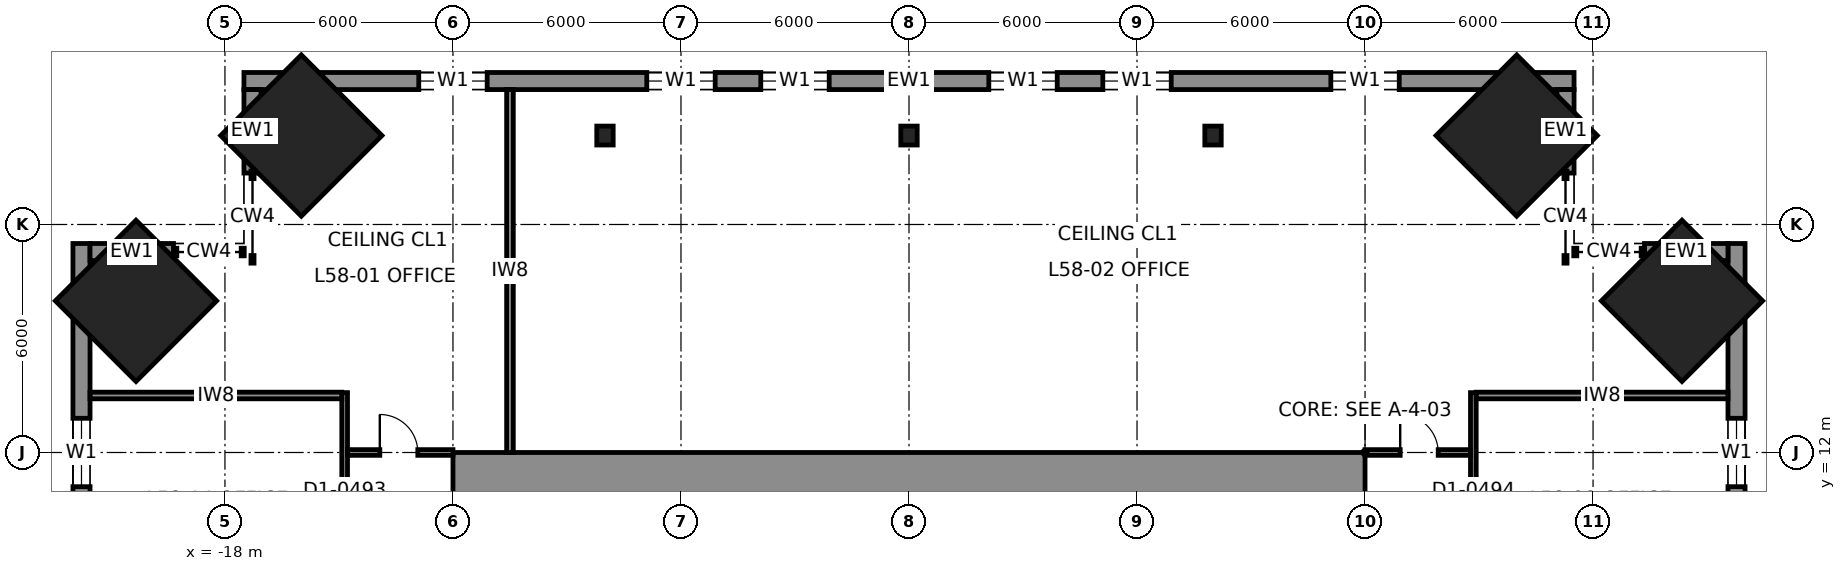
"""IFC4 building model, lengths in metres.
Left out: names, types, materials, properties, quantities, classifications, styles, units other than length and angle.
Written with IfcOpenShell. Run it as: python <this file> out.ifc"""

import sys

from ifc_helpers import new_model, si_unit, direction, frame, frame_2d, origin, origin_2d, place, context, subcontext, project, spatial, rectangle, i_section, extrude, element, fill, save


model = new_model("IFC4")
c1 = context("Model", 3, precision=1e-05, world=origin(), true_north=direction((0.0, 1.0)))
c2 = subcontext(c1, "Body", "Model", "MODEL_VIEW")
j1 = project(units=[si_unit("LENGTHUNIT", "METRE"), si_unit("PLANEANGLEUNIT", "RADIAN")], contexts=[c1])
p1 = place(None, origin())
s1 = spatial("IfcSite", under=j1, at=p1, CompositionType="ELEMENT")
p2 = place(p1, origin())
s2 = spatial("IfcBuilding", under=s1, at=p2, CompositionType="ELEMENT")
p3 = place(p2, frame((0.0, 0.0, 261.8)))
s3 = spatial("IfcBuildingStorey", under=s2, at=p3, CompositionType="ELEMENT", Elevation=261.8)
for number, where, z_axis, x_axis in (
    (1, (15.99, 20.34, 0.0), (-0.04, -0.04, 0.998), (0.708, -0.707, 0.0)),
    (2, (20.34, 15.99, 0.0), (-0.04, -0.04, 0.998), (0.707, -0.708, 0.0)),
    (3, (-20.34, 15.99, 0.0), (0.04, -0.04, 0.998), (0.707, 0.708, 0.0)),
    (4, (-15.99, 20.34, 0.0), (0.04, -0.04, 0.998), (0.708, 0.707, 0.0)),
):
    element("IfcColumn", number, at=place(p3, frame(where, z_axis=z_axis, x_axis=x_axis)), inside=s3, PredefinedType="COLUMN", context=c2, shape_type="SweptSolid", body=[
        extrude(rectangle(XDim=3.0, YDim=3.0, at=origin_2d()), origin(), (0.0, 0.0, 1.0), 4.007),
    ])
for number, where, z_axis, x_axis in (
    (5, (0.0, 20.34, 0.0), (0.0, -0.04, 0.999), (1.0, 0.0, 0.0)),
    (6, (8.0, 20.34, 0.0), (0.0, -0.04, 0.999), (1.0, 0.0, 0.0)),
    (7, (-8.0, 20.34, 0.0), (0.0, -0.04, 0.999), (1.0, 0.0, 0.0)),
):
    element("IfcColumn", number, at=place(p3, frame(where, z_axis=z_axis, x_axis=x_axis)), inside=s3, PredefinedType="COLUMN", context=c2, shape_type="SweptSolid", body=[
        extrude(i_section(OverallWidth=0.432, OverallDepth=0.498, WebThickness=0.056, FlangeThickness=0.089, at=origin_2d()), origin(), (0.0, 0.0, 1.0), 4.003),
    ])
p4 = place(p3, frame((-12.0, 11.25, 0.0), z_axis=(0.0, 0.0, 1.0), x_axis=(1.0, 0.0, 0.0)))
e8 = element("IfcWall", 8, at=p4, inside=s3, PredefinedType="SHEAR", context=c2, shape_type="SweptSolid", body=[
    extrude(rectangle(XDim=24.0, YDim=1.5, at=frame_2d((12.0, 0.0))), origin(), (0.0, 0.0, 1.0), 4.0),
])
p5 = place(p3, frame((17.5, 21.775, 0.0), z_axis=(0.0, 0.0, 1.0), x_axis=(-1.0, 0.0, 0.0)))
e9 = element("IfcWall", 9, at=p5, inside=s3, PredefinedType="SOLIDWALL", context=c2, shape_type="SweptSolid", body=[
    extrude(rectangle(XDim=35.0, YDim=0.45, at=frame_2d((17.5, 0.0))), origin(), (0.0, 0.0, 1.0), 3.83),
])
p6 = place(p5, frame((4.6, 0.0, 0.7)))
e10 = element("IfcOpeningElement", 10, at=p6, cuts=e9, PredefinedType="OPENING", context=c2, shape_type="SweptSolid", body=[
    extrude(rectangle(XDim=1.8, YDim=2.6, at=frame_2d((0.9, 1.3))), frame((0.0, 0.235, 0.0), z_axis=(0.0, -1.0, 0.0), x_axis=(1.0, 0.0, 0.0)), (0.0, 0.0, 1.0), 0.47),
])
p7 = place(p5, frame((10.6, 0.0, 0.7)))
e11 = element("IfcOpeningElement", 11, at=p7, cuts=e9, PredefinedType="OPENING", context=c2, shape_type="SweptSolid", body=[
    extrude(rectangle(XDim=1.8, YDim=2.6, at=frame_2d((0.9, 1.3))), frame((0.0, 0.235, 0.0), z_axis=(0.0, -1.0, 0.0), x_axis=(1.0, 0.0, 0.0)), (0.0, 0.0, 1.0), 0.47),
])
p8 = place(p5, frame((13.6, 0.0, 0.7)))
e12 = element("IfcOpeningElement", 12, at=p8, cuts=e9, PredefinedType="OPENING", context=c2, shape_type="SweptSolid", body=[
    extrude(rectangle(XDim=1.8, YDim=2.6, at=frame_2d((0.9, 1.3))), frame((0.0, 0.235, 0.0), z_axis=(0.0, -1.0, 0.0), x_axis=(1.0, 0.0, 0.0)), (0.0, 0.0, 1.0), 0.47),
])
p9 = place(p5, frame((19.6, 0.0, 0.7)))
e13 = element("IfcOpeningElement", 13, at=p9, cuts=e9, PredefinedType="OPENING", context=c2, shape_type="SweptSolid", body=[
    extrude(rectangle(XDim=1.8, YDim=2.6, at=frame_2d((0.9, 1.3))), frame((0.0, 0.235, 0.0), z_axis=(0.0, -1.0, 0.0), x_axis=(1.0, 0.0, 0.0)), (0.0, 0.0, 1.0), 0.47),
])
p10 = place(p5, frame((22.6, 0.0, 0.7)))
e14 = element("IfcOpeningElement", 14, at=p10, cuts=e9, PredefinedType="OPENING", context=c2, shape_type="SweptSolid", body=[
    extrude(rectangle(XDim=1.8, YDim=2.6, at=frame_2d((0.9, 1.3))), frame((0.0, 0.235, 0.0), z_axis=(0.0, -1.0, 0.0), x_axis=(1.0, 0.0, 0.0)), (0.0, 0.0, 1.0), 0.47),
])
p11 = place(p5, frame((28.6, 0.0, 0.7)))
e15 = element("IfcOpeningElement", 15, at=p11, cuts=e9, PredefinedType="OPENING", context=c2, shape_type="SweptSolid", body=[
    extrude(rectangle(XDim=1.8, YDim=2.6, at=frame_2d((0.9, 1.3))), frame((0.0, 0.235, 0.0), z_axis=(0.0, -1.0, 0.0), x_axis=(1.0, 0.0, 0.0)), (0.0, 0.0, 1.0), 0.47),
])
p12 = place(p3, frame((21.775, -17.5, 0.0), z_axis=(0.0, 0.0, 1.0), x_axis=(0.0, 1.0, 0.0)))
e16 = element("IfcWall", 16, at=p12, inside=s3, PredefinedType="SOLIDWALL", context=c2, shape_type="SweptSolid", body=[
    extrude(rectangle(XDim=35.0, YDim=0.45, at=frame_2d((17.5, 0.0))), origin(), (0.0, 0.0, 1.0), 3.83),
])
p13 = place(p12, frame((4.6, 0.0, 0.7)))
e17 = element("IfcOpeningElement", 17, at=p13, cuts=e16, PredefinedType="OPENING", context=c2, shape_type="SweptSolid", body=[
    extrude(rectangle(XDim=1.8, YDim=2.6, at=frame_2d((0.9, 1.3))), frame((0.0, 0.235, 0.0), z_axis=(0.0, -1.0, 0.0), x_axis=(1.0, 0.0, 0.0)), (0.0, 0.0, 1.0), 0.47),
])
p14 = place(p12, frame((10.6, 0.0, 0.7)))
e18 = element("IfcOpeningElement", 18, at=p14, cuts=e16, PredefinedType="OPENING", context=c2, shape_type="SweptSolid", body=[
    extrude(rectangle(XDim=1.8, YDim=2.6, at=frame_2d((0.9, 1.3))), frame((0.0, 0.235, 0.0), z_axis=(0.0, -1.0, 0.0), x_axis=(1.0, 0.0, 0.0)), (0.0, 0.0, 1.0), 0.47),
])
p15 = place(p12, frame((13.6, 0.0, 0.7)))
e19 = element("IfcOpeningElement", 19, at=p15, cuts=e16, PredefinedType="OPENING", context=c2, shape_type="SweptSolid", body=[
    extrude(rectangle(XDim=1.8, YDim=2.6, at=frame_2d((0.9, 1.3))), frame((0.0, 0.235, 0.0), z_axis=(0.0, -1.0, 0.0), x_axis=(1.0, 0.0, 0.0)), (0.0, 0.0, 1.0), 0.47),
])
p16 = place(p12, frame((19.6, 0.0, 0.7)))
e20 = element("IfcOpeningElement", 20, at=p16, cuts=e16, PredefinedType="OPENING", context=c2, shape_type="SweptSolid", body=[
    extrude(rectangle(XDim=1.8, YDim=2.6, at=frame_2d((0.9, 1.3))), frame((0.0, 0.235, 0.0), z_axis=(0.0, -1.0, 0.0), x_axis=(1.0, 0.0, 0.0)), (0.0, 0.0, 1.0), 0.47),
])
p17 = place(p12, frame((22.6, 0.0, 0.7)))
e21 = element("IfcOpeningElement", 21, at=p17, cuts=e16, PredefinedType="OPENING", context=c2, shape_type="SweptSolid", body=[
    extrude(rectangle(XDim=1.8, YDim=2.6, at=frame_2d((0.9, 1.3))), frame((0.0, 0.235, 0.0), z_axis=(0.0, -1.0, 0.0), x_axis=(1.0, 0.0, 0.0)), (0.0, 0.0, 1.0), 0.47),
])
p18 = place(p12, frame((28.6, 0.0, 0.7)))
e22 = element("IfcOpeningElement", 22, at=p18, cuts=e16, PredefinedType="OPENING", context=c2, shape_type="SweptSolid", body=[
    extrude(rectangle(XDim=1.8, YDim=2.6, at=frame_2d((0.9, 1.3))), frame((0.0, 0.235, 0.0), z_axis=(0.0, -1.0, 0.0), x_axis=(1.0, 0.0, 0.0)), (0.0, 0.0, 1.0), 0.47),
])
p19 = place(p3, frame((-21.775, 17.5, 0.0), z_axis=(0.0, 0.0, 1.0), x_axis=(0.0, -1.0, 0.0)))
e23 = element("IfcWall", 23, at=p19, inside=s3, PredefinedType="SOLIDWALL", context=c2, shape_type="SweptSolid", body=[
    extrude(rectangle(XDim=35.0, YDim=0.45, at=frame_2d((17.5, 0.0))), origin(), (0.0, 0.0, 1.0), 3.83),
])
p20 = place(p19, frame((4.6, 0.0, 0.7)))
e24 = element("IfcOpeningElement", 24, at=p20, cuts=e23, PredefinedType="OPENING", context=c2, shape_type="SweptSolid", body=[
    extrude(rectangle(XDim=1.8, YDim=2.6, at=frame_2d((0.9, 1.3))), frame((0.0, 0.235, 0.0), z_axis=(0.0, -1.0, 0.0), x_axis=(1.0, 0.0, 0.0)), (0.0, 0.0, 1.0), 0.47),
])
p21 = place(p19, frame((10.6, 0.0, 0.7)))
e25 = element("IfcOpeningElement", 25, at=p21, cuts=e23, PredefinedType="OPENING", context=c2, shape_type="SweptSolid", body=[
    extrude(rectangle(XDim=1.8, YDim=2.6, at=frame_2d((0.9, 1.3))), frame((0.0, 0.235, 0.0), z_axis=(0.0, -1.0, 0.0), x_axis=(1.0, 0.0, 0.0)), (0.0, 0.0, 1.0), 0.47),
])
p22 = place(p19, frame((13.6, 0.0, 0.7)))
e26 = element("IfcOpeningElement", 26, at=p22, cuts=e23, PredefinedType="OPENING", context=c2, shape_type="SweptSolid", body=[
    extrude(rectangle(XDim=1.8, YDim=2.6, at=frame_2d((0.9, 1.3))), frame((0.0, 0.235, 0.0), z_axis=(0.0, -1.0, 0.0), x_axis=(1.0, 0.0, 0.0)), (0.0, 0.0, 1.0), 0.47),
])
p23 = place(p19, frame((19.6, 0.0, 0.7)))
e27 = element("IfcOpeningElement", 27, at=p23, cuts=e23, PredefinedType="OPENING", context=c2, shape_type="SweptSolid", body=[
    extrude(rectangle(XDim=1.8, YDim=2.6, at=frame_2d((0.9, 1.3))), frame((0.0, 0.235, 0.0), z_axis=(0.0, -1.0, 0.0), x_axis=(1.0, 0.0, 0.0)), (0.0, 0.0, 1.0), 0.47),
])
p24 = place(p19, frame((22.6, 0.0, 0.7)))
e28 = element("IfcOpeningElement", 28, at=p24, cuts=e23, PredefinedType="OPENING", context=c2, shape_type="SweptSolid", body=[
    extrude(rectangle(XDim=1.8, YDim=2.6, at=frame_2d((0.9, 1.3))), frame((0.0, 0.235, 0.0), z_axis=(0.0, -1.0, 0.0), x_axis=(1.0, 0.0, 0.0)), (0.0, 0.0, 1.0), 0.47),
])
p25 = place(p19, frame((28.6, 0.0, 0.7)))
e29 = element("IfcOpeningElement", 29, at=p25, cuts=e23, PredefinedType="OPENING", context=c2, shape_type="SweptSolid", body=[
    extrude(rectangle(XDim=1.8, YDim=2.6, at=frame_2d((0.9, 1.3))), frame((0.0, 0.235, 0.0), z_axis=(0.0, -1.0, 0.0), x_axis=(1.0, 0.0, 0.0)), (0.0, 0.0, 1.0), 0.47),
])
for number, where, z_axis, x_axis in (
    (30, (17.275, 19.354, 0.0), (0.0, 0.0, 1.0), (0.0, 1.0, 0.0)),
    (31, (19.354, 17.275, 0.0), (0.0, 0.0, 1.0), (1.0, 0.0, 0.0)),
    (32, (-17.275, 19.354, 0.0), (0.0, 0.0, 1.0), (0.0, 1.0, 0.0)),
    (33, (-19.354, 17.275, 0.0), (0.0, 0.0, 1.0), (-1.0, 0.0, 0.0)),
):
    element("IfcWall", number, at=place(p3, frame(where, z_axis=z_axis, x_axis=x_axis)), inside=s3, PredefinedType="SOLIDWALL", context=c2, shape_type="SweptSolid", body=[
        extrude(rectangle(XDim=2.196, YDim=0.45, at=frame_2d((1.098, 0.0))), origin(), (0.0, 0.0, 1.0), 3.83),
    ])
p26 = place(p3, frame((14.85, -13.575, 0.0), z_axis=(0.0, 0.0, 1.0), x_axis=(0.0, 1.0, 0.0)))
e34 = element("IfcWall", 34, at=p26, inside=s3, PredefinedType="PARTITIONING", context=c2, shape_type="SweptSolid", body=[
    extrude(rectangle(XDim=27.15, YDim=0.15, at=frame_2d((13.575, 0.0))), origin(), (0.0, 0.0, 1.0), 3.83),
])
p27 = place(p26, frame((3.175, 0.0, 0.0)))
e35 = element("IfcOpeningElement", 35, at=p27, cuts=e34, PredefinedType="OPENING", context=c2, shape_type="SweptSolid", body=[
    extrude(rectangle(XDim=1.0, YDim=2.3, at=frame_2d((0.5, 1.15))), frame((0.0, 0.085, 0.0), z_axis=(0.0, -1.0, 0.0), x_axis=(1.0, 0.0, 0.0)), (0.0, 0.0, 1.0), 0.17),
])
p28 = place(p26, frame((6.625, 0.0, 0.0)))
e36 = element("IfcOpeningElement", 36, at=p28, cuts=e34, PredefinedType="OPENING", context=c2, shape_type="SweptSolid", body=[
    extrude(rectangle(XDim=1.0, YDim=2.3, at=frame_2d((0.5, 1.15))), frame((0.0, 0.085, 0.0), z_axis=(0.0, -1.0, 0.0), x_axis=(1.0, 0.0, 0.0)), (0.0, 0.0, 1.0), 0.17),
])
p29 = place(p26, frame((19.775, 0.0, 0.0)))
e37 = element("IfcOpeningElement", 37, at=p29, cuts=e34, PredefinedType="OPENING", context=c2, shape_type="SweptSolid", body=[
    extrude(rectangle(XDim=1.0, YDim=2.3, at=frame_2d((0.5, 1.15))), frame((0.0, 0.085, 0.0), z_axis=(0.0, -1.0, 0.0), x_axis=(1.0, 0.0, 0.0)), (0.0, 0.0, 1.0), 0.17),
])
p30 = place(p26, frame((22.975, 0.0, 0.0)))
e38 = element("IfcOpeningElement", 38, at=p30, cuts=e34, PredefinedType="OPENING", context=c2, shape_type="SweptSolid", body=[
    extrude(rectangle(XDim=1.0, YDim=2.3, at=frame_2d((0.5, 1.15))), frame((0.0, 0.085, 0.0), z_axis=(0.0, -1.0, 0.0), x_axis=(1.0, 0.0, 0.0)), (0.0, 0.0, 1.0), 0.17),
])
p31 = place(p26, frame((16.825, 0.0, 0.0)))
e39 = element("IfcOpeningElement", 39, at=p31, cuts=e34, PredefinedType="OPENING", context=c2, shape_type="SweptSolid", body=[
    extrude(rectangle(XDim=1.0, YDim=2.3, at=frame_2d((0.5, 1.15))), frame((0.0, 0.085, 0.0), z_axis=(0.0, -1.0, 0.0), x_axis=(1.0, 0.0, 0.0)), (0.0, 0.0, 1.0), 0.17),
])
p32 = place(p26, frame((9.575, 0.0, 0.0)))
e40 = element("IfcOpeningElement", 40, at=p32, cuts=e34, PredefinedType="OPENING", context=c2, shape_type="SweptSolid", body=[
    extrude(rectangle(XDim=1.0, YDim=2.3, at=frame_2d((0.5, 1.15))), frame((0.0, 0.085, 0.0), z_axis=(0.0, -1.0, 0.0), x_axis=(1.0, 0.0, 0.0)), (0.0, 0.0, 1.0), 0.17),
])
p33 = place(p3, frame((-14.85, 13.575, 0.0), z_axis=(0.0, 0.0, 1.0), x_axis=(0.0, -1.0, 0.0)))
e41 = element("IfcWall", 41, at=p33, inside=s3, PredefinedType="PARTITIONING", context=c2, shape_type="SweptSolid", body=[
    extrude(rectangle(XDim=27.15, YDim=0.15, at=frame_2d((13.575, 0.0))), origin(), (0.0, 0.0, 1.0), 3.83),
])
p34 = place(p33, frame((22.975, 0.0, 0.0)))
e42 = element("IfcOpeningElement", 42, at=p34, cuts=e41, PredefinedType="OPENING", context=c2, shape_type="SweptSolid", body=[
    extrude(rectangle(XDim=1.0, YDim=2.3, at=frame_2d((0.5, 1.15))), frame((0.0, 0.085, 0.0), z_axis=(0.0, -1.0, 0.0), x_axis=(1.0, 0.0, 0.0)), (0.0, 0.0, 1.0), 0.17),
])
p35 = place(p33, frame((19.525, 0.0, 0.0)))
e43 = element("IfcOpeningElement", 43, at=p35, cuts=e41, PredefinedType="OPENING", context=c2, shape_type="SweptSolid", body=[
    extrude(rectangle(XDim=1.0, YDim=2.3, at=frame_2d((0.5, 1.15))), frame((0.0, 0.085, 0.0), z_axis=(0.0, -1.0, 0.0), x_axis=(1.0, 0.0, 0.0)), (0.0, 0.0, 1.0), 0.17),
])
p36 = place(p33, frame((6.375, 0.0, 0.0)))
e44 = element("IfcOpeningElement", 44, at=p36, cuts=e41, PredefinedType="OPENING", context=c2, shape_type="SweptSolid", body=[
    extrude(rectangle(XDim=1.0, YDim=2.3, at=frame_2d((0.5, 1.15))), frame((0.0, 0.085, 0.0), z_axis=(0.0, -1.0, 0.0), x_axis=(1.0, 0.0, 0.0)), (0.0, 0.0, 1.0), 0.17),
])
p37 = place(p33, frame((3.175, 0.0, 0.0)))
e45 = element("IfcOpeningElement", 45, at=p37, cuts=e41, PredefinedType="OPENING", context=c2, shape_type="SweptSolid", body=[
    extrude(rectangle(XDim=1.0, YDim=2.3, at=frame_2d((0.5, 1.15))), frame((0.0, 0.085, 0.0), z_axis=(0.0, -1.0, 0.0), x_axis=(1.0, 0.0, 0.0)), (0.0, 0.0, 1.0), 0.17),
])
p38 = place(p33, frame((9.575, 0.0, 0.0)))
e46 = element("IfcOpeningElement", 46, at=p38, cuts=e41, PredefinedType="OPENING", context=c2, shape_type="SweptSolid", body=[
    extrude(rectangle(XDim=1.0, YDim=2.3, at=frame_2d((0.5, 1.15))), frame((0.0, 0.085, 0.0), z_axis=(0.0, -1.0, 0.0), x_axis=(1.0, 0.0, 0.0)), (0.0, 0.0, 1.0), 0.17),
])
p39 = place(p33, frame((16.575, 0.0, 0.0)))
e47 = element("IfcOpeningElement", 47, at=p39, cuts=e41, PredefinedType="OPENING", context=c2, shape_type="SweptSolid", body=[
    extrude(rectangle(XDim=1.0, YDim=2.3, at=frame_2d((0.5, 1.15))), frame((0.0, 0.085, 0.0), z_axis=(0.0, -1.0, 0.0), x_axis=(1.0, 0.0, 0.0)), (0.0, 0.0, 1.0), 0.17),
])
p40 = place(p3, frame((12.0, 12.0, 0.0), z_axis=(0.0, 0.0, 1.0), x_axis=(1.0, 0.0, 0.0)))
e48 = element("IfcWall", 48, at=p40, inside=s3, PredefinedType="PARTITIONING", context=c2, shape_type="SweptSolid", body=[
    extrude(rectangle(XDim=2.775, YDim=0.15, at=frame_2d((1.387, 0.0))), origin(), (0.0, 0.0, 1.0), 3.83),
])
p41 = place(p40, frame((0.925, 0.0, 0.0)))
e49 = element("IfcOpeningElement", 49, at=p41, cuts=e48, PredefinedType="OPENING", context=c2, shape_type="SweptSolid", body=[
    extrude(rectangle(XDim=1.0, YDim=2.3, at=frame_2d((0.5, 1.15))), frame((0.0, 0.085, 0.0), z_axis=(0.0, -1.0, 0.0), x_axis=(1.0, 0.0, 0.0)), (0.0, 0.0, 1.0), 0.17),
])
p42 = place(p3, frame((-14.775, 12.0, 0.0), z_axis=(0.0, 0.0, 1.0), x_axis=(1.0, 0.0, 0.0)))
e50 = element("IfcWall", 50, at=p42, inside=s3, PredefinedType="PARTITIONING", context=c2, shape_type="SweptSolid", body=[
    extrude(rectangle(XDim=2.775, YDim=0.15, at=frame_2d((1.387, 0.0))), origin(), (0.0, 0.0, 1.0), 3.83),
])
p43 = place(p42, frame((0.85, 0.0, 0.0)))
e51 = element("IfcOpeningElement", 51, at=p43, cuts=e50, PredefinedType="OPENING", context=c2, shape_type="SweptSolid", body=[
    extrude(rectangle(XDim=1.0, YDim=2.3, at=frame_2d((0.5, 1.15))), frame((0.0, 0.085, 0.0), z_axis=(0.0, -1.0, 0.0), x_axis=(1.0, 0.0, 0.0)), (0.0, 0.0, 1.0), 0.17),
])
for number, where, z_axis, x_axis in (
    (52, (14.925, 13.5, 0.0), (0.0, 0.0, 1.0), (1.0, 0.0, 0.0)),
    (53, (-21.55, 13.5, 0.0), (0.0, 0.0, 1.0), (1.0, 0.0, 0.0)),
):
    element("IfcWall", number, at=place(p3, frame(where, z_axis=z_axis, x_axis=x_axis)), inside=s3, PredefinedType="PARTITIONING", context=c2, shape_type="SweptSolid", body=[
        extrude(rectangle(XDim=6.625, YDim=0.175, at=frame_2d((3.312, 0.0))), origin(), (0.0, 0.0, 1.0), 3.83),
    ])
p44 = place(p3, frame((-10.5, 12.0, 0.0), z_axis=(0.0, 0.0, 1.0), x_axis=(0.0, 1.0, 0.0)))
e54 = element("IfcWall", 54, at=p44, inside=s3, PredefinedType="PARTITIONING", context=c2, shape_type="SweptSolid", body=[
    extrude(rectangle(XDim=9.55, YDim=0.175, at=frame_2d((4.775, 0.0))), origin(), (0.0, 0.0, 1.0), 3.83),
])
p45 = place(p6, origin())
e55 = element("IfcWindow", 55, at=p45, inside=s3, PartitioningType="SINGLE_PANEL", PredefinedType="WINDOW", context=c2, shape_type="SweptSolid", body=[
    extrude(rectangle(XDim=1.8, YDim=2.6, at=frame_2d((0.9, 1.3))), frame((0.0, 0.03, 0.0), z_axis=(0.0, -1.0, 0.0), x_axis=(1.0, 0.0, 0.0)), (0.0, 0.0, 1.0), 0.06),
])
fill(e10, e55)
p46 = place(p7, origin())
e56 = element("IfcWindow", 56, at=p46, inside=s3, PartitioningType="SINGLE_PANEL", PredefinedType="WINDOW", context=c2, shape_type="SweptSolid", body=[
    extrude(rectangle(XDim=1.8, YDim=2.6, at=frame_2d((0.9, 1.3))), frame((0.0, 0.03, 0.0), z_axis=(0.0, -1.0, 0.0), x_axis=(1.0, 0.0, 0.0)), (0.0, 0.0, 1.0), 0.06),
])
fill(e11, e56)
p47 = place(p8, origin())
e57 = element("IfcWindow", 57, at=p47, inside=s3, PartitioningType="SINGLE_PANEL", PredefinedType="WINDOW", context=c2, shape_type="SweptSolid", body=[
    extrude(rectangle(XDim=1.8, YDim=2.6, at=frame_2d((0.9, 1.3))), frame((0.0, 0.03, 0.0), z_axis=(0.0, -1.0, 0.0), x_axis=(1.0, 0.0, 0.0)), (0.0, 0.0, 1.0), 0.06),
])
fill(e12, e57)
p48 = place(p9, origin())
e58 = element("IfcWindow", 58, at=p48, inside=s3, PartitioningType="SINGLE_PANEL", PredefinedType="WINDOW", context=c2, shape_type="SweptSolid", body=[
    extrude(rectangle(XDim=1.8, YDim=2.6, at=frame_2d((0.9, 1.3))), frame((0.0, 0.03, 0.0), z_axis=(0.0, -1.0, 0.0), x_axis=(1.0, 0.0, 0.0)), (0.0, 0.0, 1.0), 0.06),
])
fill(e13, e58)
p49 = place(p10, origin())
e59 = element("IfcWindow", 59, at=p49, inside=s3, PartitioningType="SINGLE_PANEL", PredefinedType="WINDOW", context=c2, shape_type="SweptSolid", body=[
    extrude(rectangle(XDim=1.8, YDim=2.6, at=frame_2d((0.9, 1.3))), frame((0.0, 0.03, 0.0), z_axis=(0.0, -1.0, 0.0), x_axis=(1.0, 0.0, 0.0)), (0.0, 0.0, 1.0), 0.06),
])
fill(e14, e59)
p50 = place(p11, origin())
e60 = element("IfcWindow", 60, at=p50, inside=s3, PartitioningType="SINGLE_PANEL", PredefinedType="WINDOW", context=c2, shape_type="SweptSolid", body=[
    extrude(rectangle(XDim=1.8, YDim=2.6, at=frame_2d((0.9, 1.3))), frame((0.0, 0.03, 0.0), z_axis=(0.0, -1.0, 0.0), x_axis=(1.0, 0.0, 0.0)), (0.0, 0.0, 1.0), 0.06),
])
fill(e15, e60)
p51 = place(p18, origin())
e61 = element("IfcWindow", 61, at=p51, inside=s3, PartitioningType="SINGLE_PANEL", PredefinedType="WINDOW", context=c2, shape_type="SweptSolid", body=[
    extrude(rectangle(XDim=1.8, YDim=2.6, at=frame_2d((0.9, 1.3))), frame((0.0, 0.03, 0.0), z_axis=(0.0, -1.0, 0.0), x_axis=(1.0, 0.0, 0.0)), (0.0, 0.0, 1.0), 0.06),
])
fill(e22, e61)
p52 = place(p20, origin())
e62 = element("IfcWindow", 62, at=p52, inside=s3, PartitioningType="SINGLE_PANEL", PredefinedType="WINDOW", context=c2, shape_type="SweptSolid", body=[
    extrude(rectangle(XDim=1.8, YDim=2.6, at=frame_2d((0.9, 1.3))), frame((0.0, 0.03, 0.0), z_axis=(0.0, -1.0, 0.0), x_axis=(1.0, 0.0, 0.0)), (0.0, 0.0, 1.0), 0.06),
])
fill(e24, e62)
p53 = place(p43, origin())
e63 = element("IfcDoor", 63, at=p53, inside=s3, OperationType="SINGLE_SWING_LEFT", PredefinedType="DOOR", context=c2, shape_type="SweptSolid", body=[
    extrude(rectangle(XDim=1.0, YDim=2.3, at=frame_2d((0.5, 1.15))), frame((0.0, 0.025, 0.0), z_axis=(0.0, -1.0, 0.0), x_axis=(1.0, 0.0, 0.0)), (0.0, 0.0, 1.0), 0.05),
])
fill(e51, e63)
p54 = place(p41, origin())
e64 = element("IfcDoor", 64, at=p54, inside=s3, OperationType="SINGLE_SWING_LEFT", PredefinedType="DOOR", context=c2, shape_type="SweptSolid", body=[
    extrude(rectangle(XDim=1.0, YDim=2.3, at=frame_2d((0.5, 1.15))), frame((0.0, 0.025, 0.0), z_axis=(0.0, -1.0, 0.0), x_axis=(1.0, 0.0, 0.0)), (0.0, 0.0, 1.0), 0.05),
])
fill(e49, e64)
save(model, sys.argv[1])
